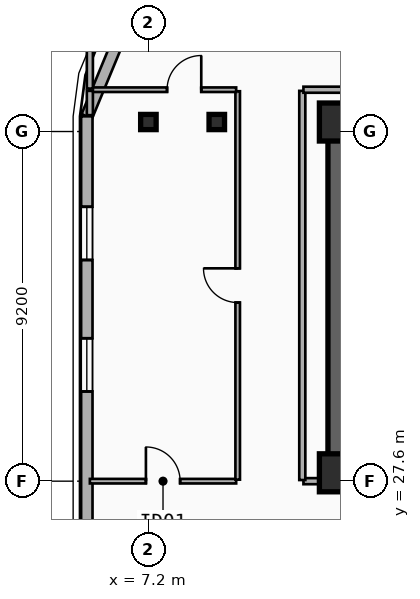
"""IFC4 building model, lengths in metres.
Left out: names, types, materials, properties, quantities, classifications, styles, units other than length and angle.
Written with IfcOpenShell. Run it as: python <this file> out.ifc"""

import sys

from ifc_helpers import new_model, si_unit, direction, frame, frame_2d, origin, origin_2d, place, context, subcontext, project, spatial, rectangle, i_section, extrude, element, fill, save


model = new_model("IFC4")
c1 = context("Model", 3, precision=1e-05, world=origin(), true_north=direction((0.0, 1.0)))
c2 = subcontext(c1, "Body", "Model", "MODEL_VIEW")
j1 = project(units=[si_unit("LENGTHUNIT", "METRE"), si_unit("PLANEANGLEUNIT", "RADIAN")], contexts=[c1])
p1 = place(None, origin())
s1 = spatial("IfcSite", under=j1, at=p1, CompositionType="ELEMENT")
p2 = place(p1, origin())
s2 = spatial("IfcBuilding", under=s1, at=p2, CompositionType="ELEMENT")
p3 = place(p2, frame((0.0, 0.0, 229.2)))
s3 = spatial("IfcBuildingStorey", under=s2, at=p3, CompositionType="ELEMENT", Elevation=229.2)
p4 = place(p3, frame((12.15, 37.05, 0.0), z_axis=(0.0, 0.0, 1.0), x_axis=(1.0, 0.0, 0.0)))
e1 = element("IfcWall", 1, at=p4, inside=s3, PredefinedType="SHEAR", context=c2, shape_type="SweptSolid", body=[
    extrude(rectangle(XDim=33.23, YDim=0.45, at=frame_2d((16.615, 0.0))), origin(), (0.0, 0.0, 1.0), 3.6),
])
p5 = place(p3, frame((21.18, 27.82, 0.0), z_axis=(0.0, 0.0, 1.0), x_axis=(-1.0, 0.0, 0.0)))
e2 = element("IfcWall", 2, at=p5, inside=s3, PredefinedType="SHEAR", context=c2, shape_type="SweptSolid", body=[
    extrude(rectangle(XDim=9.03, YDim=0.45, at=frame_2d((4.515, 0.0))), origin(), (0.0, 0.0, 1.0), 3.6),
])
p6 = place(p5, frame((2.68, 0.0, 0.0)))
e3 = element("IfcOpeningElement", 3, at=p6, cuts=e2, PredefinedType="OPENING", context=c2, shape_type="SweptSolid", body=[
    extrude(rectangle(XDim=1.1, YDim=2.15, at=frame_2d((0.55, 1.075))), frame((0.0, 0.235, 0.0), z_axis=(0.0, -1.0, 0.0), x_axis=(1.0, 0.0, 0.0)), (0.0, 0.0, 1.0), 0.47),
])
p7 = place(p3, frame((12.15, 28.045, 0.0), z_axis=(0.0, 0.0, 1.0), x_axis=(0.0, 1.0, 0.0)))
e4 = element("IfcWall", 4, at=p7, inside=s3, PredefinedType="SHEAR", context=c2, shape_type="SweptSolid", body=[
    extrude(rectangle(XDim=8.78, YDim=0.45, at=frame_2d((4.39, 0.0))), origin(), (0.0, 0.0, 1.0), 3.6),
])
for number, where, z_axis, x_axis in (
    (5, (12.2, 27.82, 0.0), (0.0, 0.0, 1.0), (1.0, 0.0, 0.0)),
    (6, (12.2, 37.05, 0.0), (0.0, 0.0, 1.0), (1.0, 0.0, 0.0)),
):
    element("IfcColumn", number, at=place(p3, frame(where, z_axis=z_axis, x_axis=x_axis)), inside=s3, PredefinedType="COLUMN", context=c2, shape_type="SweptSolid", body=[
        extrude(rectangle(XDim=1.0, YDim=1.0, at=origin_2d()), origin(), (0.0, 0.0, 1.0), 3.6),
    ])
for number, where, z_axis, x_axis in (
    (7, (9.0, 37.05, 0.0), (0.0, 0.0, 1.0), (1.0, 0.0, 0.0)),
    (8, (7.2, 37.05, 0.0), (0.0, 0.0, 1.0), (1.0, 0.0, 0.0)),
):
    element("IfcColumn", number, at=place(p3, frame(where, z_axis=z_axis, x_axis=x_axis)), inside=s3, PredefinedType="COLUMN", context=c2, shape_type="SweptSolid", body=[
        extrude(i_section(OverallWidth=0.408, OverallDepth=0.4, WebThickness=0.025, FlangeThickness=0.039, FilletRadius=0.015, at=origin_2d()), origin(), (0.0, 0.0, 1.0), 3.6),
    ])
p8 = place(p3, frame((5.58, 37.2, 0.0), z_axis=(0.0, 0.0, 1.0), x_axis=(0.382636798336, 0.92389884758, 0.0)))
e9 = element("IfcWall", 9, at=p8, inside=s3, PredefinedType="SOLIDWALL", context=c2, shape_type="SweptSolid", body=[
    extrude(rectangle(XDim=3.077, YDim=0.3, at=frame_2d((1.538, 0.0))), origin(), (0.0, 0.0, 1.0), 3.34),
])
p9 = place(p3, frame((5.58, 8.6, 0.0), z_axis=(0.0, 0.0, 1.0), x_axis=(0.0, 1.0, 0.0)))
e10 = element("IfcWall", 10, at=p9, inside=s3, PredefinedType="SOLIDWALL", context=c2, shape_type="SweptSolid", body=[
    extrude(rectangle(XDim=28.6, YDim=0.3, at=frame_2d((14.3, 0.0))), origin(), (0.0, 0.0, 1.0), 3.34),
])
p10 = place(p9, frame((21.36, 0.0, 0.34)))
e11 = element("IfcOpeningElement", 11, at=p10, cuts=e10, PredefinedType="OPENING", context=c2, shape_type="SweptSolid", body=[
    extrude(rectangle(XDim=1.4, YDim=2.1, at=frame_2d((0.7, 1.05))), frame((0.0, 0.16, 0.0), z_axis=(0.0, -1.0, 0.0), x_axis=(1.0, 0.0, 0.0)), (0.0, 0.0, 1.0), 0.32),
])
p11 = place(p9, frame((24.82, 0.0, 0.34)))
e12 = element("IfcOpeningElement", 12, at=p11, cuts=e10, PredefinedType="OPENING", context=c2, shape_type="SweptSolid", body=[
    extrude(rectangle(XDim=1.4, YDim=2.1, at=frame_2d((0.7, 1.05))), frame((0.0, 0.16, 0.0), z_axis=(0.0, -1.0, 0.0), x_axis=(1.0, 0.0, 0.0)), (0.0, 0.0, 1.0), 0.32),
])
p12 = place(p9, frame((2.671, 0.0, 0.34)))
e13 = element("IfcOpeningElement", 13, at=p12, cuts=e10, PredefinedType="OPENING", context=c2, shape_type="SweptSolid", body=[
    extrude(rectangle(XDim=1.4, YDim=2.1, at=frame_2d((0.7, 1.05))), frame((0.0, 0.16, 0.0), z_axis=(0.0, -1.0, 0.0), x_axis=(1.0, 0.0, 0.0)), (0.0, 0.0, 1.0), 0.32),
])
p13 = place(p9, frame((6.679, 0.0, 0.34)))
e14 = element("IfcOpeningElement", 14, at=p13, cuts=e10, PredefinedType="OPENING", context=c2, shape_type="SweptSolid", body=[
    extrude(rectangle(XDim=1.4, YDim=2.1, at=frame_2d((0.7, 1.05))), frame((0.0, 0.16, 0.0), z_axis=(0.0, -1.0, 0.0), x_axis=(1.0, 0.0, 0.0)), (0.0, 0.0, 1.0), 0.32),
])
p14 = place(p9, frame((10.467, 0.0, 0.34)))
e15 = element("IfcOpeningElement", 15, at=p14, cuts=e10, PredefinedType="OPENING", context=c2, shape_type="SweptSolid", body=[
    extrude(rectangle(XDim=1.4, YDim=2.1, at=frame_2d((0.7, 1.05))), frame((0.0, 0.16, 0.0), z_axis=(0.0, -1.0, 0.0), x_axis=(1.0, 0.0, 0.0)), (0.0, 0.0, 1.0), 0.32),
])
p15 = place(p9, frame((14.256, 0.0, 0.34)))
e16 = element("IfcOpeningElement", 16, at=p15, cuts=e10, PredefinedType="OPENING", context=c2, shape_type="SweptSolid", body=[
    extrude(rectangle(XDim=1.4, YDim=2.1, at=frame_2d((0.7, 1.05))), frame((0.0, 0.16, 0.0), z_axis=(0.0, -1.0, 0.0), x_axis=(1.0, 0.0, 0.0)), (0.0, 0.0, 1.0), 0.32),
])
p16 = place(p3, frame((5.66, 27.6, 0.0), z_axis=(0.0, 0.0, 1.0), x_axis=(1.0, 0.0, 0.0)))
e17 = element("IfcWall", 17, at=p16, inside=s3, PredefinedType="PARTITIONING", context=c2, shape_type="SweptSolid", body=[
    extrude(rectangle(XDim=3.85, YDim=0.12, at=frame_2d((1.925, 0.0))), origin(), (0.0, 0.0, 1.0), 2.67),
])
p17 = place(p16, frame((1.475, 0.0, 0.0)))
e18 = element("IfcOpeningElement", 18, at=p17, cuts=e17, PredefinedType="OPENING", context=c2, shape_type="SweptSolid", body=[
    extrude(rectangle(XDim=0.9, YDim=2.1, at=frame_2d((0.45, 1.05))), frame((0.0, 0.07, 0.0), z_axis=(0.0, -1.0, 0.0), x_axis=(1.0, 0.0, 0.0)), (0.0, 0.0, 1.0), 0.14),
])
p18 = place(p3, frame((9.55, 27.64, 0.0), z_axis=(0.0, 0.0, 1.0), x_axis=(0.0, 1.0, 0.0)))
e19 = element("IfcWall", 19, at=p18, inside=s3, PredefinedType="PARTITIONING", context=c2, shape_type="SweptSolid", body=[
    extrude(rectangle(XDim=10.22, YDim=0.12, at=frame_2d((5.11, 0.0))), origin(), (0.0, 0.0, 1.0), 2.82),
])
p19 = place(p18, frame((4.66, 0.0, 0.0)))
e20 = element("IfcOpeningElement", 20, at=p19, cuts=e19, PredefinedType="OPENING", context=c2, shape_type="SweptSolid", body=[
    extrude(rectangle(XDim=0.9, YDim=2.1, at=frame_2d((0.45, 1.05))), frame((0.0, 0.07, 0.0), z_axis=(0.0, -1.0, 0.0), x_axis=(1.0, 0.0, 0.0)), (0.0, 0.0, 1.0), 0.14),
])
p20 = place(p3, frame((5.66, 37.9, 0.0), z_axis=(0.0, 0.0, 1.0), x_axis=(1.0, 0.0, 0.0)))
e21 = element("IfcWall", 21, at=p20, inside=s3, PredefinedType="PARTITIONING", context=c2, shape_type="SweptSolid", body=[
    extrude(rectangle(XDim=3.85, YDim=0.12, at=frame_2d((1.925, 0.0))), origin(), (0.0, 0.0, 1.0), 3.34),
])
p21 = place(p20, frame((2.031, 0.0, 0.0)))
e22 = element("IfcOpeningElement", 22, at=p21, cuts=e21, PredefinedType="OPENING", context=c2, shape_type="SweptSolid", body=[
    extrude(rectangle(XDim=0.9, YDim=2.1, at=frame_2d((0.45, 1.05))), frame((0.0, 0.07, 0.0), z_axis=(0.0, -1.0, 0.0), x_axis=(1.0, 0.0, 0.0)), (0.0, 0.0, 1.0), 0.14),
])
p22 = place(p3, frame((11.28, 27.6, 0.0), z_axis=(0.0, 0.0, 1.0), x_axis=(1.0, 0.0, 0.0)))
e23 = element("IfcWall", 23, at=p22, inside=s3, PredefinedType="PARTITIONING", context=c2, shape_type="SweptSolid", body=[
    extrude(rectangle(XDim=0.84, YDim=0.16, at=frame_2d((0.42, 0.0))), origin(), (0.0, 0.0, 1.0), 2.41),
])
p23 = place(p3, frame((11.25, 27.63, 0.0), z_axis=(0.0, 0.0, 1.0), x_axis=(0.0, 1.0, 0.0)))
e24 = element("IfcWall", 24, at=p23, inside=s3, PredefinedType="PARTITIONING", context=c2, shape_type="SweptSolid", body=[
    extrude(rectangle(XDim=10.24, YDim=0.16, at=frame_2d((5.12, 0.0))), origin(), (0.0, 0.0, 1.0), 2.82),
])
p24 = place(p3, frame((11.28, 37.9, 0.0), z_axis=(0.0, 0.0, 1.0), x_axis=(1.0, 0.0, 0.0)))
e25 = element("IfcWall", 25, at=p24, inside=s3, PredefinedType="PARTITIONING", context=c2, shape_type="SweptSolid", body=[
    extrude(rectangle(XDim=35.04, YDim=0.16, at=frame_2d((17.52, 0.0))), origin(), (0.0, 0.0, 1.0), 3.34),
])
p25 = place(p3, frame((5.66, 37.93, 0.0), z_axis=(0.0, 0.0, 1.0), x_axis=(0.0, 1.0, 0.0)))
e26 = element("IfcWall", 26, at=p25, inside=s3, PredefinedType="PARTITIONING", context=c2, shape_type="SweptSolid", body=[
    extrude(rectangle(XDim=1.44, YDim=0.16, at=frame_2d((0.72, 0.0))), origin(), (0.0, 0.0, 1.0), 3.34),
])
p26 = place(p3, frame((5.66, 37.23, 0.0), z_axis=(0.0, 0.0, 1.0), x_axis=(0.0, 1.0, 0.0)))
e27 = element("IfcWall", 27, at=p26, inside=s3, PredefinedType="PARTITIONING", context=c2, shape_type="SweptSolid", body=[
    extrude(rectangle(XDim=0.64, YDim=0.16, at=frame_2d((0.32, 0.0))), origin(), (0.0, 0.0, 1.0), 3.34),
])
p27 = place(p10, origin())
e28 = element("IfcWindow", 28, at=p27, inside=s3, PartitioningType="SINGLE_PANEL", PredefinedType="WINDOW", context=c2, shape_type="SweptSolid", body=[
    extrude(rectangle(XDim=1.4, YDim=2.1, at=frame_2d((0.7, 1.05))), frame((0.0, 0.03, 0.0), z_axis=(0.0, -1.0, 0.0), x_axis=(1.0, 0.0, 0.0)), (0.0, 0.0, 1.0), 0.06),
])
fill(e11, e28)
p28 = place(p11, origin())
e29 = element("IfcWindow", 29, at=p28, inside=s3, PartitioningType="SINGLE_PANEL", PredefinedType="WINDOW", context=c2, shape_type="SweptSolid", body=[
    extrude(rectangle(XDim=1.4, YDim=2.1, at=frame_2d((0.7, 1.05))), frame((0.0, 0.03, 0.0), z_axis=(0.0, -1.0, 0.0), x_axis=(1.0, 0.0, 0.0)), (0.0, 0.0, 1.0), 0.06),
])
fill(e12, e29)
p29 = place(p17, origin())
e30 = element("IfcDoor", 30, at=p29, inside=s3, OperationType="SINGLE_SWING_LEFT", PredefinedType="DOOR", context=c2, shape_type="SweptSolid", body=[
    extrude(rectangle(XDim=0.9, YDim=2.1, at=frame_2d((0.45, 1.05))), frame((0.0, 0.025, 0.0), z_axis=(0.0, -1.0, 0.0), x_axis=(1.0, 0.0, 0.0)), (0.0, 0.0, 1.0), 0.05),
])
fill(e18, e30)
p30 = place(p19, origin())
e31 = element("IfcDoor", 31, at=p30, inside=s3, OperationType="SINGLE_SWING_RIGHT", PredefinedType="DOOR", context=c2, shape_type="SweptSolid", body=[
    extrude(rectangle(XDim=0.9, YDim=2.1, at=frame_2d((0.45, 1.05))), frame((0.0, 0.025, 0.0), z_axis=(0.0, -1.0, 0.0), x_axis=(1.0, 0.0, 0.0)), (0.0, 0.0, 1.0), 0.05),
])
fill(e20, e31)
p31 = place(p21, origin())
e32 = element("IfcDoor", 32, at=p31, inside=s3, OperationType="SINGLE_SWING_RIGHT", PredefinedType="DOOR", context=c2, shape_type="SweptSolid", body=[
    extrude(rectangle(XDim=0.9, YDim=2.1, at=frame_2d((0.45, 1.05))), frame((0.0, 0.025, 0.0), z_axis=(0.0, -1.0, 0.0), x_axis=(1.0, 0.0, 0.0)), (0.0, 0.0, 1.0), 0.05),
])
fill(e22, e32)
save(model, sys.argv[1])
